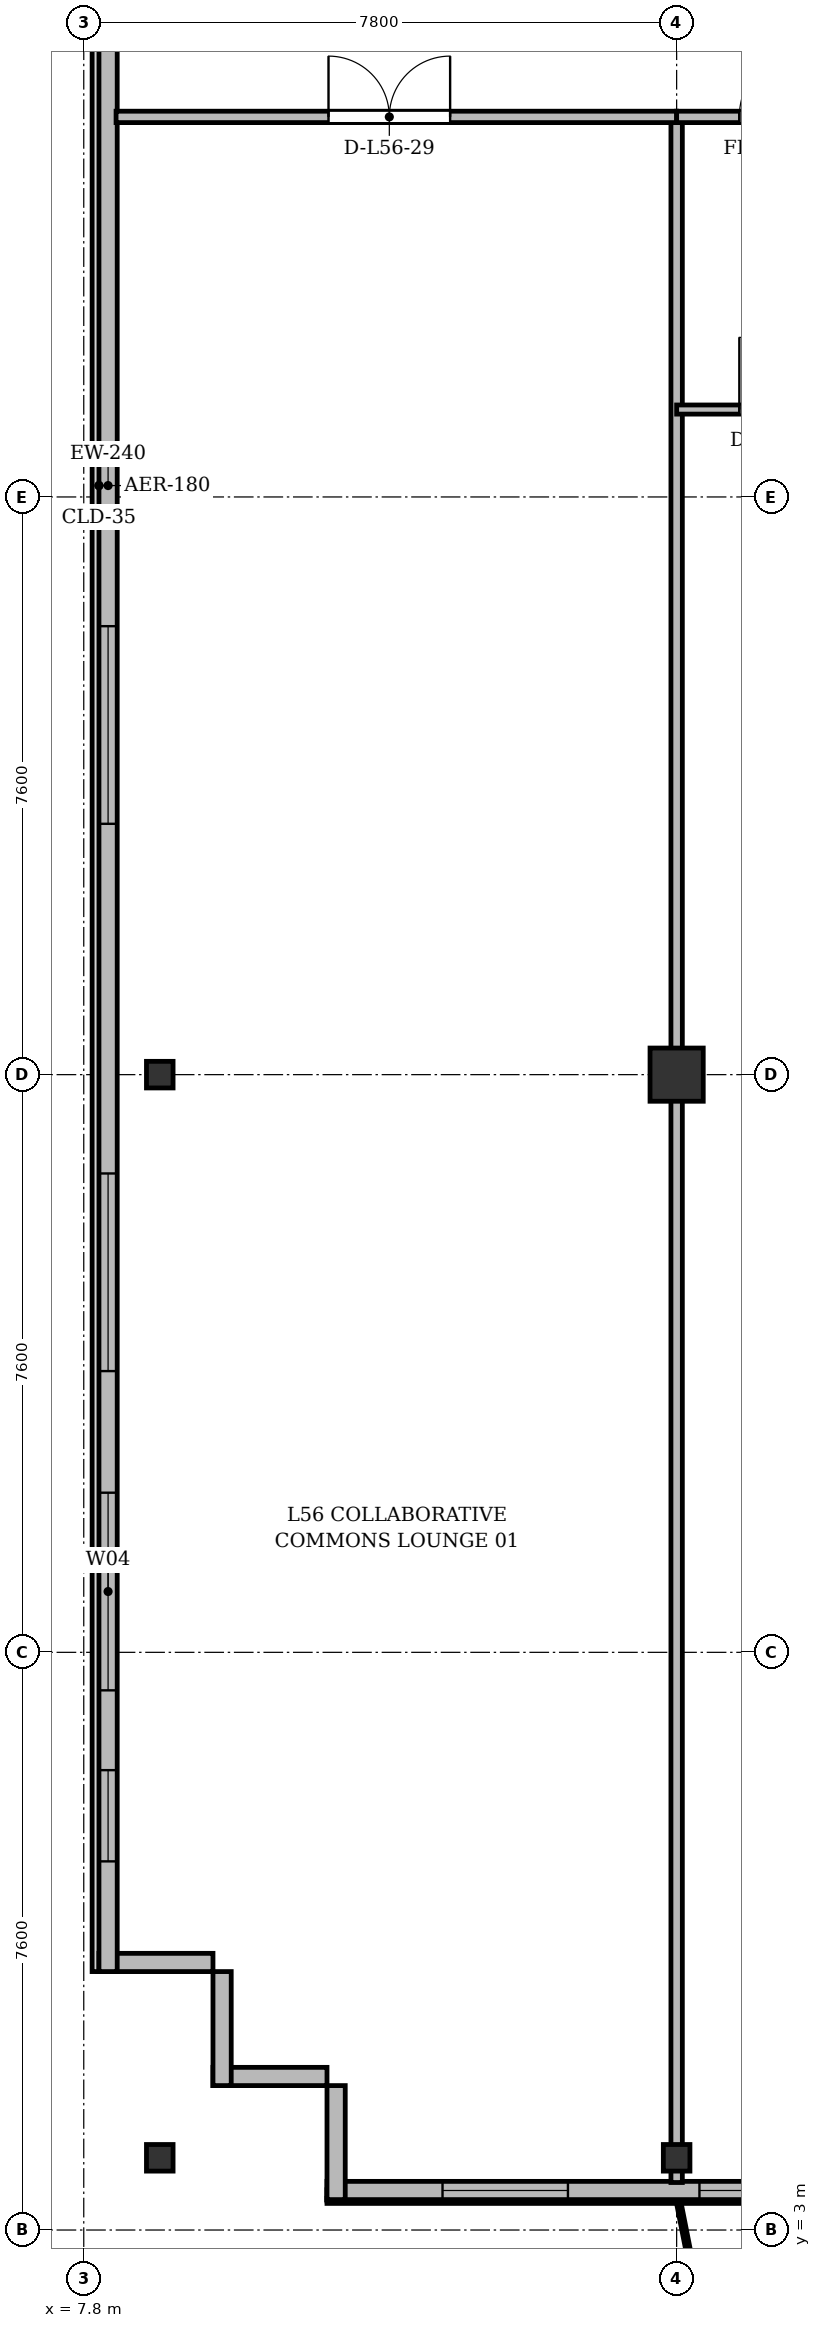
"""IFC4 building model, lengths in metres.
Left out: names, types, materials, properties, quantities, classifications, styles, units other than length and angle.
Written with IfcOpenShell. Run it as: python <this file> out.ifc"""

import sys

from ifc_helpers import new_model, si_unit, direction, frame, frame_2d, origin, origin_2d, place, context, subcontext, project, spatial, rectangle, i_section, extrude, source, transform, mapped, element, fill, save


model = new_model("IFC4")
c1 = context("Model", 3, precision=1e-05, world=origin(), true_north=direction((0.0, 1.0)))
c2 = subcontext(c1, "Body", "Model", "MODEL_VIEW")
j1 = project(units=[si_unit("LENGTHUNIT", "METRE"), si_unit("PLANEANGLEUNIT", "RADIAN")], contexts=[c1])
p1 = place(None, origin())
s1 = spatial("IfcSite", under=j1, at=p1, CompositionType="ELEMENT")
p2 = place(p1, origin())
s2 = spatial("IfcBuilding", under=s1, at=p2, CompositionType="ELEMENT")
p3 = place(p2, frame((0.0, 0.0, 215.7)))
s3 = spatial("IfcBuildingStorey", under=s2, at=p3, CompositionType="ELEMENT", Elevation=215.7)
m1 = source(origin(), c2, "Body", "SweptSolid", [
    extrude(i_section(OverallWidth=0.35, OverallDepth=0.35, WebThickness=0.018, FlangeThickness=0.028, at=origin_2d()), origin(), (0.0, 0.0, 1.0), 3.6),
])
for number, where, z_axis, x_axis in (
    (1, (8.8, 3.95, 0.0), (0.0, 0.0, 1.0), (1.0, 0.0, 0.0)),
    (2, (8.8, 18.2, 0.0), (0.0, 0.0, 1.0), (1.0, 0.0, 0.0)),
    (3, (15.6, 3.95, 0.0), (0.0, 0.0, 1.0), (1.0, 0.0, 0.0)),
):
    element("IfcColumn", number, at=place(p3, frame(where, z_axis=z_axis, x_axis=x_axis)), inside=s3, PredefinedType="COLUMN", context=c2, shape_type="MappedRepresentation", body=[
        mapped(m1, transform((0.0, 0.0, 0.0), x_axis=(1.0, 0.0, 0.0), y_axis=(0.0, 1.0, 0.0), z_axis=(0.0, 0.0, 1.0), scale=1.0)),
    ])
m2 = source(origin(), c2, "Body", "SweptSolid", [
    extrude(rectangle(XDim=0.7, YDim=0.7, at=origin_2d()), origin(), (0.0, 0.0, 1.0), 3.6),
])
p4 = place(p3, frame((15.6, 18.2, 0.0), z_axis=(0.0, 0.0, 1.0), x_axis=(1.0, 0.0, 0.0)))
e4 = element("IfcColumn", 4, at=p4, inside=s3, PredefinedType="COLUMN", context=c2, shape_type="MappedRepresentation", body=[
    mapped(m2, transform((0.0, 0.0, 0.0), x_axis=(1.0, 0.0, 0.0), y_axis=(0.0, 1.0, 0.0), z_axis=(0.0, 0.0, 1.0), scale=1.0)),
])
for number, where, z_axis, x_axis in (
    (5, (11.0, 5.02, 0.0), (0.0, 0.0, 1.0), (-1.0, 0.0, 0.0)),
    (6, (9.62, 4.9, 0.0), (0.0, 0.0, 1.0), (0.0, 1.0, 0.0)),
):
    element("IfcWall", number, at=place(p3, frame(where, z_axis=z_axis, x_axis=x_axis)), inside=s3, PredefinedType="SOLIDWALL", context=c2, shape_type="SweptSolid", body=[
        extrude(rectangle(XDim=1.5, YDim=0.24, at=frame_2d((0.75, 0.0))), origin(), (0.0, 0.0, 1.0), 3.36),
    ])
p5 = place(p3, frame((9.5, 6.52, 0.0), z_axis=(0.0, 0.0, 1.0), x_axis=(-1.0, 0.0, 0.0)))
e7 = element("IfcWall", 7, at=p5, inside=s3, PredefinedType="SOLIDWALL", context=c2, shape_type="SweptSolid", body=[
    extrude(rectangle(XDim=1.5, YDim=0.24, at=frame_2d((0.75, 0.0))), origin(), (0.0, 0.0, 1.0), 2.86),
])
p6 = place(p3, frame((8.12, 6.4, 0.0), z_axis=(0.0, 0.0, 1.0), x_axis=(0.0, 1.0, 0.0)))
e8 = element("IfcWall", 8, at=p6, inside=s3, PredefinedType="SOLIDWALL", context=c2, shape_type="SweptSolid", body=[
    extrude(rectangle(XDim=39.1, YDim=0.24, at=frame_2d((19.55, 0.0))), origin(), (0.0, 0.0, 1.0), 3.36),
])
p7 = place(p6, frame((1.45, 0.0, 0.92)))
e9 = element("IfcOpeningElement", 9, at=p7, cuts=e8, PredefinedType="OPENING", context=c2, shape_type="SweptSolid", body=[
    extrude(rectangle(XDim=1.2, YDim=1.65, at=frame_2d((0.6, 0.825))), frame((0.0, 0.13, 0.0), z_axis=(0.0, -1.0, 0.0), x_axis=(1.0, 0.0, 0.0)), (0.0, 0.0, 1.0), 0.26),
])
p8 = place(p6, frame((3.7, 0.0, 0.92)))
e10 = element("IfcOpeningElement", 10, at=p8, cuts=e8, PredefinedType="OPENING", context=c2, shape_type="SweptSolid", body=[
    extrude(rectangle(XDim=2.6, YDim=1.9, at=frame_2d((1.3, 0.95))), frame((0.0, 0.13, 0.0), z_axis=(0.0, -1.0, 0.0), x_axis=(1.0, 0.0, 0.0)), (0.0, 0.0, 1.0), 0.26),
])
p9 = place(p6, frame((7.9, 0.0, 0.92)))
e11 = element("IfcOpeningElement", 11, at=p9, cuts=e8, PredefinedType="OPENING", context=c2, shape_type="SweptSolid", body=[
    extrude(rectangle(XDim=2.6, YDim=1.9, at=frame_2d((1.3, 0.95))), frame((0.0, 0.13, 0.0), z_axis=(0.0, -1.0, 0.0), x_axis=(1.0, 0.0, 0.0)), (0.0, 0.0, 1.0), 0.26),
])
p10 = place(p6, frame((15.1, 0.0, 0.92)))
e12 = element("IfcOpeningElement", 12, at=p10, cuts=e8, PredefinedType="OPENING", context=c2, shape_type="SweptSolid", body=[
    extrude(rectangle(XDim=2.6, YDim=1.9, at=frame_2d((1.3, 0.95))), frame((0.0, 0.13, 0.0), z_axis=(0.0, -1.0, 0.0), x_axis=(1.0, 0.0, 0.0)), (0.0, 0.0, 1.0), 0.26),
])
p11 = place(p6, frame((29.1, 0.0, 0.92)))
e13 = element("IfcOpeningElement", 13, at=p11, cuts=e8, PredefinedType="OPENING", context=c2, shape_type="SweptSolid", body=[
    extrude(rectangle(XDim=2.6, YDim=1.9, at=frame_2d((1.3, 0.95))), frame((0.0, 0.13, 0.0), z_axis=(0.0, -1.0, 0.0), x_axis=(1.0, 0.0, 0.0)), (0.0, 0.0, 1.0), 0.26),
])
p12 = place(p6, frame((36.75, 0.0, 0.92)))
e14 = element("IfcOpeningElement", 14, at=p12, cuts=e8, PredefinedType="OPENING", context=c2, shape_type="SweptSolid", body=[
    extrude(rectangle(XDim=1.2, YDim=1.65, at=frame_2d((0.6, 0.825))), frame((0.0, 0.13, 0.0), z_axis=(0.0, -1.0, 0.0), x_axis=(1.0, 0.0, 0.0)), (0.0, 0.0, 1.0), 0.26),
])
p13 = place(p3, frame((63.4, 3.52, 0.0), z_axis=(0.0, 0.0, 1.0), x_axis=(-1.0, 0.0, 0.0)))
e15 = element("IfcWall", 15, at=p13, inside=s3, PredefinedType="SOLIDWALL", context=c2, shape_type="SweptSolid", body=[
    extrude(rectangle(XDim=52.4, YDim=0.24, at=frame_2d((26.2, 0.0))), origin(), (0.0, 0.0, 1.0), 3.36),
])
p14 = place(p13, frame((1.245, 0.0, 0.9)))
e16 = element("IfcOpeningElement", 16, at=p14, cuts=e15, PredefinedType="OPENING", context=c2, shape_type="SweptSolid", body=[
    extrude(rectangle(XDim=2.2, YDim=1.8, at=frame_2d((1.1, 0.9))), frame((0.0, 0.13, 0.0), z_axis=(0.0, -1.0, 0.0), x_axis=(1.0, 0.0, 0.0)), (0.0, 0.0, 1.0), 0.26),
])
p15 = place(p13, frame((5.15, 0.0, 0.9)))
e17 = element("IfcOpeningElement", 17, at=p15, cuts=e15, PredefinedType="OPENING", context=c2, shape_type="SweptSolid", body=[
    extrude(rectangle(XDim=1.5, YDim=1.75, at=frame_2d((0.75, 0.875))), frame((0.0, 0.13, 0.0), z_axis=(0.0, -1.0, 0.0), x_axis=(1.0, 0.0, 0.0)), (0.0, 0.0, 1.0), 0.26),
])
p16 = place(p13, frame((7.45, 0.0, 0.9)))
e18 = element("IfcOpeningElement", 18, at=p16, cuts=e15, PredefinedType="OPENING", context=c2, shape_type="SweptSolid", body=[
    extrude(rectangle(XDim=1.5, YDim=1.75, at=frame_2d((0.75, 0.875))), frame((0.0, 0.13, 0.0), z_axis=(0.0, -1.0, 0.0), x_axis=(1.0, 0.0, 0.0)), (0.0, 0.0, 1.0), 0.26),
])
p17 = place(p13, frame((13.575, 0.0, 0.9)))
e19 = element("IfcOpeningElement", 19, at=p17, cuts=e15, PredefinedType="OPENING", context=c2, shape_type="SweptSolid", body=[
    extrude(rectangle(XDim=1.65, YDim=1.85, at=frame_2d((0.825, 0.925))), frame((0.0, 0.13, 0.0), z_axis=(0.0, -1.0, 0.0), x_axis=(1.0, 0.0, 0.0)), (0.0, 0.0, 1.0), 0.26),
])
p18 = place(p13, frame((25.3, 0.0, 0.9)))
e20 = element("IfcOpeningElement", 20, at=p18, cuts=e15, PredefinedType="OPENING", context=c2, shape_type="SweptSolid", body=[
    extrude(rectangle(XDim=1.8, YDim=1.8, at=frame_2d((0.9, 0.9))), frame((0.0, 0.13, 0.0), z_axis=(0.0, -1.0, 0.0), x_axis=(1.0, 0.0, 0.0)), (0.0, 0.0, 1.0), 0.26),
])
p19 = place(p13, frame((36.9, 0.0, 0.9)))
e21 = element("IfcOpeningElement", 21, at=p19, cuts=e15, PredefinedType="OPENING", context=c2, shape_type="SweptSolid", body=[
    extrude(rectangle(XDim=2.2, YDim=1.8, at=frame_2d((1.1, 0.9))), frame((0.0, 0.13, 0.0), z_axis=(0.0, -1.0, 0.0), x_axis=(1.0, 0.0, 0.0)), (0.0, 0.0, 1.0), 0.26),
])
p20 = place(p13, frame((43.45, 0.0, 0.9)))
e22 = element("IfcOpeningElement", 22, at=p20, cuts=e15, PredefinedType="OPENING", context=c2, shape_type="SweptSolid", body=[
    extrude(rectangle(XDim=1.5, YDim=1.75, at=frame_2d((0.75, 0.875))), frame((0.0, 0.13, 0.0), z_axis=(0.0, -1.0, 0.0), x_axis=(1.0, 0.0, 0.0)), (0.0, 0.0, 1.0), 0.26),
])
p21 = place(p13, frame((45.5, 0.0, 0.9)))
e23 = element("IfcOpeningElement", 23, at=p21, cuts=e15, PredefinedType="OPENING", context=c2, shape_type="SweptSolid", body=[
    extrude(rectangle(XDim=2.0, YDim=1.95, at=frame_2d((1.0, 0.975))), frame((0.0, 0.13, 0.0), z_axis=(0.0, -1.0, 0.0), x_axis=(1.0, 0.0, 0.0)), (0.0, 0.0, 1.0), 0.26),
])
p22 = place(p13, frame((49.23, 0.0, 0.9)))
e24 = element("IfcOpeningElement", 24, at=p22, cuts=e15, PredefinedType="OPENING", context=c2, shape_type="SweptSolid", body=[
    extrude(rectangle(XDim=1.65, YDim=1.85, at=frame_2d((0.825, 0.925))), frame((0.0, 0.13, 0.0), z_axis=(0.0, -1.0, 0.0), x_axis=(1.0, 0.0, 0.0)), (0.0, 0.0, 1.0), 0.26),
])
p23 = place(p3, frame((11.12, 3.4, 0.0), z_axis=(0.0, 0.0, 1.0), x_axis=(0.0, 1.0, 0.0)))
e25 = element("IfcWall", 25, at=p23, inside=s3, PredefinedType="SOLIDWALL", context=c2, shape_type="SweptSolid", body=[
    extrude(rectangle(XDim=1.5, YDim=0.24, at=frame_2d((0.75, 0.0))), origin(), (0.0, 0.0, 1.0), 2.91),
])
p24 = place(p3, frame((15.6, 3.625, 0.0), z_axis=(0.0, 0.0, 1.0), x_axis=(0.0, 1.0, 0.0)))
e26 = element("IfcWall", 26, at=p24, inside=s3, PredefinedType="PARTITIONING", context=c2, shape_type="SweptSolid", body=[
    extrude(rectangle(XDim=27.175, YDim=0.15, at=frame_2d((13.587, 0.0))), origin(), (0.0, 0.0, 1.0), 2.86),
])
p25 = place(p3, frame((8.225, 30.8, 0.0), z_axis=(0.0, 0.0, 1.0), x_axis=(1.0, 0.0, 0.0)))
e27 = element("IfcWall", 27, at=p25, inside=s3, PredefinedType="PARTITIONING", context=c2, shape_type="SweptSolid", body=[
    extrude(rectangle(XDim=7.375, YDim=0.15, at=frame_2d((3.688, 0.0))), origin(), (0.0, 0.0, 1.0), 2.86),
])
p26 = place(p25, frame((2.795, 0.0, 0.0)))
e28 = element("IfcOpeningElement", 28, at=p26, cuts=e27, PredefinedType="OPENING", context=c2, shape_type="SweptSolid", body=[
    extrude(rectangle(XDim=1.6, YDim=2.2, at=frame_2d((0.8, 1.1))), frame((0.0, 0.085, 0.0), z_axis=(0.0, -1.0, 0.0), x_axis=(1.0, 0.0, 0.0)), (0.0, 0.0, 1.0), 0.17),
])
p27 = place(p3, frame((15.6, 30.8, 0.0), z_axis=(0.0, 0.0, 1.0), x_axis=(1.0, 0.0, 0.0)))
e29 = element("IfcWall", 29, at=p27, inside=s3, PredefinedType="PARTITIONING", context=c2, shape_type="SweptSolid", body=[
    extrude(rectangle(XDim=2.6, YDim=0.15, at=frame_2d((1.3, 0.0))), origin(), (0.0, 0.0, 1.0), 2.86),
])
p28 = place(p27, frame((0.825, 0.0, 0.0)))
e30 = element("IfcOpeningElement", 30, at=p28, cuts=e29, PredefinedType="OPENING", context=c2, shape_type="SweptSolid", body=[
    extrude(rectangle(XDim=0.95, YDim=2.15, at=frame_2d((0.475, 1.075))), frame((0.0, 0.085, 0.0), z_axis=(0.0, -1.0, 0.0), x_axis=(1.0, 0.0, 0.0)), (0.0, 0.0, 1.0), 0.17),
])
p29 = place(p3, frame((15.6, 26.95, 0.0), z_axis=(0.0, 0.0, 1.0), x_axis=(1.0, 0.0, 0.0)))
e31 = element("IfcWall", 31, at=p29, inside=s3, PredefinedType="PARTITIONING", context=c2, shape_type="SweptSolid", body=[
    extrude(rectangle(XDim=2.6, YDim=0.12, at=frame_2d((1.3, 0.0))), origin(), (0.0, 0.0, 1.0), 2.86),
])
p30 = place(p29, frame((0.825, 0.0, 0.0)))
e32 = element("IfcOpeningElement", 32, at=p30, cuts=e31, PredefinedType="OPENING", context=c2, shape_type="SweptSolid", body=[
    extrude(rectangle(XDim=0.95, YDim=2.15, at=frame_2d((0.475, 1.075))), frame((0.0, 0.07, 0.0), z_axis=(0.0, -1.0, 0.0), x_axis=(1.0, 0.0, 0.0)), (0.0, 0.0, 1.0), 0.14),
])
m3 = source(origin(), c2, "Body", "SweptSolid", [
    extrude(rectangle(XDim=1.2, YDim=1.65, at=frame_2d((0.6, 0.825))), frame((0.0, 0.03, 0.0), z_axis=(0.0, -1.0, 0.0), x_axis=(1.0, 0.0, 0.0)), (0.0, 0.0, 1.0), 0.06),
])
p31 = place(p7, origin())
e33 = element("IfcWindow", 33, at=p31, inside=s3, PartitioningType="SINGLE_PANEL", PredefinedType="WINDOW", context=c2, shape_type="MappedRepresentation", body=[
    mapped(m3, transform((0.0, 0.0, 0.0), x_axis=(1.0, 0.0, 0.0), y_axis=(0.0, 1.0, 0.0), z_axis=(0.0, 0.0, 1.0), scale=1.0)),
])
fill(e9, e33)
m4 = source(origin(), c2, "Body", "SweptSolid", [
    extrude(rectangle(XDim=2.6, YDim=1.9, at=frame_2d((1.3, 0.95))), frame((0.0, 0.03, 0.0), z_axis=(0.0, -1.0, 0.0), x_axis=(1.0, 0.0, 0.0)), (0.0, 0.0, 1.0), 0.06),
])
p32 = place(p8, origin())
e34 = element("IfcWindow", 34, at=p32, inside=s3, PartitioningType="SINGLE_PANEL", PredefinedType="WINDOW", context=c2, shape_type="MappedRepresentation", body=[
    mapped(m4, transform((0.0, 0.0, 0.0), x_axis=(1.0, 0.0, 0.0), y_axis=(0.0, 1.0, 0.0), z_axis=(0.0, 0.0, 1.0), scale=1.0)),
])
fill(e10, e34)
p33 = place(p9, origin())
e35 = element("IfcWindow", 35, at=p33, inside=s3, PartitioningType="SINGLE_PANEL", PredefinedType="WINDOW", context=c2, shape_type="MappedRepresentation", body=[
    mapped(m4, transform((0.0, 0.0, 0.0), x_axis=(1.0, 0.0, 0.0), y_axis=(0.0, 1.0, 0.0), z_axis=(0.0, 0.0, 1.0), scale=1.0)),
])
fill(e11, e35)
p34 = place(p10, origin())
e36 = element("IfcWindow", 36, at=p34, inside=s3, PartitioningType="SINGLE_PANEL", PredefinedType="WINDOW", context=c2, shape_type="MappedRepresentation", body=[
    mapped(m4, transform((0.0, 0.0, 0.0), x_axis=(1.0, 0.0, 0.0), y_axis=(0.0, 1.0, 0.0), z_axis=(0.0, 0.0, 1.0), scale=1.0)),
])
fill(e12, e36)
m5 = source(origin(), c2, "Body", "SweptSolid", [
    extrude(rectangle(XDim=2.0, YDim=1.95, at=frame_2d((1.0, 0.975))), frame((0.0, 0.03, 0.0), z_axis=(0.0, -1.0, 0.0), x_axis=(1.0, 0.0, 0.0)), (0.0, 0.0, 1.0), 0.06),
])
p35 = place(p21, origin())
e37 = element("IfcWindow", 37, at=p35, inside=s3, PartitioningType="SINGLE_PANEL", PredefinedType="WINDOW", context=c2, shape_type="MappedRepresentation", body=[
    mapped(m5, transform((0.0, 0.0, 0.0), x_axis=(1.0, 0.0, 0.0), y_axis=(0.0, 1.0, 0.0), z_axis=(0.0, 0.0, 1.0), scale=1.0)),
])
fill(e23, e37)
m6 = source(origin(), c2, "Body", "SweptSolid", [
    extrude(rectangle(XDim=1.65, YDim=1.85, at=frame_2d((0.825, 0.925))), frame((0.0, 0.03, 0.0), z_axis=(0.0, -1.0, 0.0), x_axis=(1.0, 0.0, 0.0)), (0.0, 0.0, 1.0), 0.06),
])
p36 = place(p22, origin())
e38 = element("IfcWindow", 38, at=p36, inside=s3, PartitioningType="SINGLE_PANEL", PredefinedType="WINDOW", context=c2, shape_type="MappedRepresentation", body=[
    mapped(m6, transform((0.0, 0.0, 0.0), x_axis=(1.0, 0.0, 0.0), y_axis=(0.0, 1.0, 0.0), z_axis=(0.0, 0.0, 1.0), scale=1.0)),
])
fill(e24, e38)
m7 = source(origin(), c2, "Body", "SweptSolid", [
    extrude(rectangle(XDim=1.6, YDim=2.2, at=frame_2d((0.8, 1.1))), frame((0.0, 0.025, 0.0), z_axis=(0.0, -1.0, 0.0), x_axis=(1.0, 0.0, 0.0)), (0.0, 0.0, 1.0), 0.05),
])
p37 = place(p26, origin())
e39 = element("IfcDoor", 39, at=p37, inside=s3, OperationType="DOUBLE_DOOR_SINGLE_SWING", PredefinedType="DOOR", context=c2, shape_type="MappedRepresentation", body=[
    mapped(m7, transform((0.0, 0.0, 0.0), x_axis=(1.0, 0.0, 0.0), y_axis=(0.0, 1.0, 0.0), z_axis=(0.0, 0.0, 1.0), scale=1.0)),
])
fill(e28, e39)
m8 = source(origin(), c2, "Body", "SweptSolid", [
    extrude(rectangle(XDim=0.95, YDim=2.15, at=frame_2d((0.475, 1.075))), frame((0.0, 0.025, 0.0), z_axis=(0.0, -1.0, 0.0), x_axis=(1.0, 0.0, 0.0)), (0.0, 0.0, 1.0), 0.05),
])
p38 = place(p28, origin())
e40 = element("IfcDoor", 40, at=p38, inside=s3, OperationType="SINGLE_SWING_RIGHT", PredefinedType="DOOR", context=c2, shape_type="MappedRepresentation", body=[
    mapped(m8, transform((0.0, 0.0, 0.0), x_axis=(1.0, 0.0, 0.0), y_axis=(0.0, 1.0, 0.0), z_axis=(0.0, 0.0, 1.0), scale=1.0)),
])
fill(e30, e40)
p39 = place(p30, origin())
e41 = element("IfcDoor", 41, at=p39, inside=s3, OperationType="SINGLE_SWING_LEFT", PredefinedType="DOOR", context=c2, shape_type="MappedRepresentation", body=[
    mapped(m8, transform((0.0, 0.0, 0.0), x_axis=(1.0, 0.0, 0.0), y_axis=(0.0, 1.0, 0.0), z_axis=(0.0, 0.0, 1.0), scale=1.0)),
])
fill(e32, e41)
save(model, sys.argv[1])
